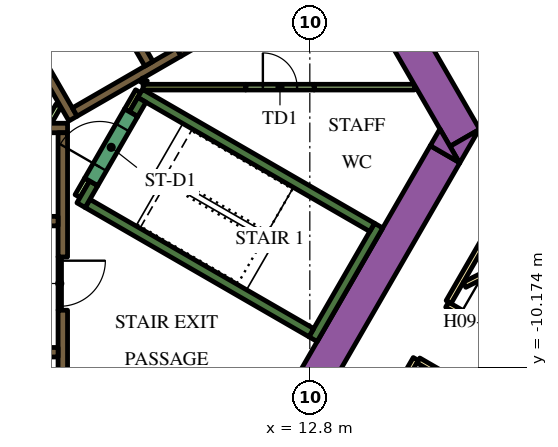
"""IFC4 building model, lengths in metres.
Left out: names, types, materials, properties, quantities, classifications, styles, units other than length and angle.
Written with IfcOpenShell. Run it as: python <this file> out.ifc"""

import sys

from ifc_helpers import new_model, si_unit, direction, frame, frame_2d, origin, place, context, subcontext, project, spatial, polyline, rectangle, outline, extrude, element, fill, save


model = new_model("IFC4")
c1 = context("Model", 3, precision=1e-05, world=origin(), true_north=direction((0.0, 1.0)))
c2 = subcontext(c1, "Body", "Model", "MODEL_VIEW")
j1 = project(units=[si_unit("LENGTHUNIT", "METRE"), si_unit("PLANEANGLEUNIT", "RADIAN")], contexts=[c1])
p1 = place(None, origin())
s1 = spatial("IfcSite", under=j1, at=p1, CompositionType="ELEMENT")
p2 = place(p1, origin())
s2 = spatial("IfcBuilding", under=s1, at=p2, CompositionType="ELEMENT")
p3 = place(p2, frame((0.0, 0.0, 126.6)))
s3 = spatial("IfcBuildingStorey", under=s2, at=p3, CompositionType="ELEMENT", Elevation=126.6)
p4 = place(p3, frame((6.776, 13.364, 0.0), z_axis=(0.0, 0.0, 1.0), x_axis=(0.500004177138, -0.8660229921, 0.0)))
e1 = element("IfcWall", 1, at=p4, inside=s3, PredefinedType="SOLIDWALL", context=c2, shape_type="SweptSolid", body=[
    extrude(rectangle(XDim=20.204, YDim=0.9, at=frame_2d((10.102, 0.0))), origin(), (0.0, 0.0, 1.0), 3.9),
])
p5 = place(p3, origin())
e2 = element("IfcWall", 2, at=p5, inside=s3, PredefinedType="SOLIDWALL", context=c2, shape_type="SweptSolid", body=[
    extrude(outline(polyline([(16.743, -4.8), (16.489, -4.36), (17.251, -3.92), (16.743, -4.8)])), origin(), (0.0, 0.0, 1.0), 3.9),
])
p6 = place(p3, frame((11.695, -12.644, 0.0), z_axis=(0.0, 0.0, 1.0), x_axis=(0.500010229568, 0.86601949766, 0.0)))
e3 = element("IfcWall", 3, at=p6, inside=s3, PredefinedType="SOLIDWALL", context=c2, shape_type="SweptSolid", body=[
    extrude(rectangle(XDim=9.326, YDim=0.9, at=frame_2d((4.663, 0.0))), origin(), (0.0, 0.0, 1.0), 3.9),
])
e4 = element("IfcWall", 4, at=p5, inside=s3, PredefinedType="SOLIDWALL", context=c2, shape_type="SweptSolid", body=[
    extrude(outline(polyline([(16.223, -3.9), (16.732, -4.78), (15.969, -4.34), (16.223, -3.9)])), origin(), (0.0, 0.0, 1.0), 3.9),
])
p7 = place(p3, frame((12.885, -9.431, 0.0), z_axis=(0.0, 0.0, 1.0), x_axis=(0.500020560727, 0.866013532718, 0.0)))
e5 = element("IfcWall", 5, at=p7, inside=s3, PredefinedType="SOLIDWALL", context=c2, shape_type="SweptSolid", body=[
    extrude(rectangle(XDim=3.45, YDim=0.25, at=frame_2d((1.725, 0.0))), origin(), (0.0, 0.0, 1.0), 3.9),
])
p8 = place(p3, frame((12.84, -9.261, 0.0), z_axis=(0.0, 0.0, 1.0), x_axis=(-0.866013990052, 0.500019768644, 0.0)))
e6 = element("IfcWall", 6, at=p8, inside=s3, PredefinedType="SOLIDWALL", context=c2, shape_type="SweptSolid", body=[
    extrude(rectangle(XDim=6.8, YDim=0.25, at=frame_2d((3.4, 0.0))), origin(), (0.0, 0.0, 1.0), 3.9),
])
p9 = place(p3, frame((7.113, -5.33, 0.0), z_axis=(0.0, 0.0, 1.0), x_axis=(-0.499965889992, -0.866045096311, 0.0)))
e7 = element("IfcWall", 7, at=p9, inside=s3, PredefinedType="SOLIDWALL", context=c2, shape_type="SweptSolid", body=[
    extrude(rectangle(XDim=0.666, YDim=0.25, at=frame_2d((0.333, 0.0))), origin(), (0.0, 0.0, 1.0), 3.9),
])
p10 = place(p3, frame((8.334, -2.964, 0.0), z_axis=(0.0, 0.0, 1.0), x_axis=(0.866016039709, -0.500016218704, 0.0)))
e8 = element("IfcWall", 8, at=p10, inside=s3, PredefinedType="SOLIDWALL", context=c2, shape_type="SweptSolid", body=[
    extrude(rectangle(XDim=7.05, YDim=0.25, at=frame_2d((3.525, 0.0))), origin(), (0.0, 0.0, 1.0), 3.9),
])
p11 = place(p3, frame((8.163, -3.511, 0.0), z_axis=(0.0, 0.0, 1.0), x_axis=(0.500127794843, 0.865951608824, 0.0)))
e9 = element("IfcWall", 9, at=p11, inside=s3, PredefinedType="SOLIDWALL", context=c2, shape_type="SweptSolid", body=[
    extrude(rectangle(XDim=0.435, YDim=0.25, at=frame_2d((0.217, 0.0))), origin(), (0.0, 0.0, 1.0), 3.9),
])
p12 = place(p3, frame((-6.19, -3.875, 0.0), z_axis=(0.0, 0.0, 1.0), x_axis=(1.0, 0.0, 0.0)))
e10 = element("IfcWall", 10, at=p12, inside=s3, PredefinedType="SOLIDWALL", context=c2, shape_type="SweptSolid", body=[
    extrude(rectangle(XDim=12.615, YDim=0.25, at=frame_2d((6.307, 0.0))), origin(), (0.0, 0.0, 1.0), 3.9),
])
p13 = place(p3, frame((6.3, -8.67, 0.0), z_axis=(0.0, 0.0, 1.0), x_axis=(0.0, -1.0, 0.0)))
e11 = element("IfcWall", 11, at=p13, inside=s3, PredefinedType="SOLIDWALL", context=c2, shape_type="SweptSolid", body=[
    extrude(rectangle(XDim=3.43, YDim=0.25, at=frame_2d((1.715, 0.0))), origin(), (0.0, 0.0, 1.0), 3.9),
])
p14 = place(p3, frame((6.3, -7.268, 0.0), z_axis=(0.0, 0.0, 1.0), x_axis=(0.0, 1.0, 0.0)))
e12 = element("IfcWall", 12, at=p14, inside=s3, PredefinedType="SOLIDWALL", context=c2, shape_type="SweptSolid", body=[
    extrude(rectangle(XDim=3.268, YDim=0.25, at=frame_2d((1.634, 0.0))), origin(), (0.0, 0.0, 1.0), 3.9),
])
e13 = element("IfcWall", 13, at=p5, inside=s3, PredefinedType="SOLIDWALL", context=c2, shape_type="SweptSolid", body=[
    extrude(outline(polyline([(0.335, 6.925), (0.335, 6.925), (0.335, 7.075), (0.335, 7.075), (0.335, 7.075), (0.245, 7.075), (0.079, 7.363), (0.035, 7.439), (0.252, 7.564), (0.377, 7.348), (6.552, -3.348), (6.677, -3.564), (6.46, -3.689), (4.897, -0.981), (0.332, 6.925), (0.335, 6.925), (0.335, 6.925)])), origin(), (0.0, 0.0, 1.0), 3.9),
])
p15 = place(p3, frame((9.352, -1.875, 0.0), z_axis=(0.0, 0.0, 1.0), x_axis=(-0.866024844342, -0.500000968981, 0.0)))
e14 = element("IfcWall", 14, at=p15, inside=s3, PredefinedType="SOLIDWALL", context=c2, shape_type="SweptSolid", body=[
    extrude(rectangle(XDim=3.162, YDim=0.25, at=frame_2d((1.581, 0.0))), origin(), (0.0, 0.0, 1.0), 3.9),
])
p16 = place(p3, frame((6.688, -5.667, 0.0), z_axis=(0.0, 0.0, 1.0), x_axis=(0.499834152157, 0.86612113491, 0.0)))
e15 = element("IfcWall", 15, at=p16, inside=s3, PredefinedType="PARTITIONING", context=c2, shape_type="SweptSolid", body=[
    extrude(rectangle(XDim=0.505, YDim=0.15, at=frame_2d((0.252, 0.0))), origin(), (0.0, 0.0, 1.0), 2.75),
])
p17 = place(p3, frame((5.936, -3.718, 0.0), z_axis=(0.0, 0.0, 1.0), x_axis=(0.499890179513, 0.866088799389, 0.0)))
e16 = element("IfcWall", 16, at=p17, inside=s3, PredefinedType="PARTITIONING", context=c2, shape_type="SweptSolid", body=[
    extrude(rectangle(XDim=0.504, YDim=0.15, at=frame_2d((0.252, 0.0))), origin(), (0.0, 0.0, 1.0), 2.75),
])
p18 = place(p3, frame((8.412, -2.8, 0.0), z_axis=(0.0, 0.0, 1.0), x_axis=(1.0, 0.0, 0.0)))
e17 = element("IfcWall", 17, at=p18, inside=s3, PredefinedType="PARTITIONING", context=c2, shape_type="SweptSolid", body=[
    extrude(rectangle(XDim=2.702, YDim=0.15, at=frame_2d((1.351, 0.0))), origin(), (0.0, 0.0, 1.0), 3.9),
])
p19 = place(p3, frame((8.459, -2.599, 0.0), z_axis=(0.0, 0.0, 1.0), x_axis=(-0.501919277433, -0.864914469148, 0.0)))
e18 = element("IfcWall", 18, at=p19, inside=s3, PredefinedType="PARTITIONING", context=c2, shape_type="SweptSolid", body=[
    extrude(rectangle(XDim=0.109, YDim=0.15, at=frame_2d((0.054, 0.0))), origin(), (0.0, 0.0, 1.0), 3.9),
])
p20 = place(p3, frame((8.281, -2.907, 0.0), z_axis=(0.0, 0.0, 1.0), x_axis=(-0.500193841991, -0.86591346013, 0.0)))
e19 = element("IfcWall", 19, at=p20, inside=s3, PredefinedType="PARTITIONING", context=c2, shape_type="SweptSolid", body=[
    extrude(rectangle(XDim=0.583, YDim=0.15, at=frame_2d((0.292, 0.0))), origin(), (0.0, 0.0, 1.0), 3.9),
])
p21 = place(p3, frame((12.915, -2.8, 0.0), z_axis=(0.0, 0.0, 1.0), x_axis=(1.0, 0.0, 0.0)))
e20 = element("IfcWall", 20, at=p21, inside=s3, PredefinedType="PARTITIONING", context=c2, shape_type="SweptSolid", body=[
    extrude(rectangle(XDim=2.637, YDim=0.15, at=frame_2d((1.318, 0.0))), origin(), (0.0, 0.0, 1.0), 2.75),
])
p22 = place(p3, frame((-6.175, -9.775, 0.0), z_axis=(0.0, 0.0, 1.0), x_axis=(1.0, 0.0, 0.0)))
e21 = element("IfcWall", 21, at=p22, inside=s3, PredefinedType="SOLIDWALL", context=c2, shape_type="SweptSolid", body=[
    extrude(rectangle(XDim=12.35, YDim=0.25, at=frame_2d((6.175, 0.0))), origin(), (0.0, 0.0, 1.0), 3.9),
])
p23 = place(p22, frame((0.585, 0.0, 0.0)))
e22 = element("IfcOpeningElement", 22, at=p23, cuts=e21, PredefinedType="OPENING", context=c2, shape_type="SweptSolid", body=[
    extrude(rectangle(XDim=1.1, YDim=2.1, at=frame_2d((0.55, 1.05))), frame((0.0, 0.135, 0.0), z_axis=(0.0, -1.0, 0.0), x_axis=(1.0, 0.0, 0.0)), (0.0, 0.0, 1.0), 0.27),
])
p24 = place(p22, frame((3.105, 0.0, 0.0)))
e23 = element("IfcOpeningElement", 23, at=p24, cuts=e21, PredefinedType="OPENING", context=c2, shape_type="SweptSolid", body=[
    extrude(rectangle(XDim=1.1, YDim=2.1, at=frame_2d((0.55, 1.05))), frame((0.0, 0.135, 0.0), z_axis=(0.0, -1.0, 0.0), x_axis=(1.0, 0.0, 0.0)), (0.0, 0.0, 1.0), 0.27),
])
p25 = place(p22, frame((5.625, 0.0, 0.0)))
e24 = element("IfcOpeningElement", 24, at=p25, cuts=e21, PredefinedType="OPENING", context=c2, shape_type="SweptSolid", body=[
    extrude(rectangle(XDim=1.1, YDim=2.1, at=frame_2d((0.55, 1.05))), frame((0.0, 0.135, 0.0), z_axis=(0.0, -1.0, 0.0), x_axis=(1.0, 0.0, 0.0)), (0.0, 0.0, 1.0), 0.27),
])
p26 = place(p22, frame((8.145, 0.0, 0.0)))
e25 = element("IfcOpeningElement", 25, at=p26, cuts=e21, PredefinedType="OPENING", context=c2, shape_type="SweptSolid", body=[
    extrude(rectangle(XDim=1.1, YDim=2.1, at=frame_2d((0.55, 1.05))), frame((0.0, 0.135, 0.0), z_axis=(0.0, -1.0, 0.0), x_axis=(1.0, 0.0, 0.0)), (0.0, 0.0, 1.0), 0.27),
])
p27 = place(p22, frame((10.665, 0.0, 0.0)))
e26 = element("IfcOpeningElement", 26, at=p27, cuts=e21, PredefinedType="OPENING", context=c2, shape_type="SweptSolid", body=[
    extrude(rectangle(XDim=1.1, YDim=2.1, at=frame_2d((0.55, 1.05))), frame((0.0, 0.135, 0.0), z_axis=(0.0, -1.0, 0.0), x_axis=(1.0, 0.0, 0.0)), (0.0, 0.0, 1.0), 0.27),
])
p28 = place(p3, frame((-6.175, -6.325, 0.0), z_axis=(0.0, 0.0, 1.0), x_axis=(1.0, 0.0, 0.0)))
e27 = element("IfcWall", 27, at=p28, inside=s3, PredefinedType="SOLIDWALL", context=c2, shape_type="SweptSolid", body=[
    extrude(rectangle(XDim=12.35, YDim=0.25, at=frame_2d((6.175, 0.0))), origin(), (0.0, 0.0, 1.0), 3.9),
])
p29 = place(p28, frame((3.205, 0.0, 0.0)))
e28 = element("IfcOpeningElement", 28, at=p29, cuts=e27, PredefinedType="OPENING", context=c2, shape_type="SweptSolid", body=[
    extrude(rectangle(XDim=0.9, YDim=2.1, at=frame_2d((0.45, 1.05))), frame((0.0, 0.135, 0.0), z_axis=(0.0, -1.0, 0.0), x_axis=(1.0, 0.0, 0.0)), (0.0, 0.0, 1.0), 0.27),
])
p30 = place(p28, frame((8.145, 0.0, 0.0)))
e29 = element("IfcOpeningElement", 29, at=p30, cuts=e27, PredefinedType="OPENING", context=c2, shape_type="SweptSolid", body=[
    extrude(rectangle(XDim=1.1, YDim=2.1, at=frame_2d((0.55, 1.05))), frame((0.0, 0.135, 0.0), z_axis=(0.0, -1.0, 0.0), x_axis=(1.0, 0.0, 0.0)), (0.0, 0.0, 1.0), 0.27),
])
p31 = place(p28, frame((10.665, 0.0, 0.0)))
e30 = element("IfcOpeningElement", 30, at=p31, cuts=e27, PredefinedType="OPENING", context=c2, shape_type="SweptSolid", body=[
    extrude(rectangle(XDim=1.1, YDim=2.1, at=frame_2d((0.55, 1.05))), frame((0.0, 0.135, 0.0), z_axis=(0.0, -1.0, 0.0), x_axis=(1.0, 0.0, 0.0)), (0.0, 0.0, 1.0), 0.27),
])
p32 = place(p3, frame((8.565, -2.185, 0.0), z_axis=(0.0, 0.0, 1.0), x_axis=(-0.499997954832, 0.866026584559, 0.0)))
e31 = element("IfcWall", 31, at=p32, inside=s3, PredefinedType="SOLIDWALL", context=c2, shape_type="SweptSolid", body=[
    extrude(rectangle(XDim=12.35, YDim=0.25, at=frame_2d((6.175, 0.0))), origin(), (0.0, 0.0, 1.0), 3.9),
])
p33 = place(p32, frame((5.725, 0.0, 0.0)))
e32 = element("IfcOpeningElement", 32, at=p33, cuts=e31, PredefinedType="OPENING", context=c2, shape_type="SweptSolid", body=[
    extrude(rectangle(XDim=0.9, YDim=2.1, at=frame_2d((0.45, 1.05))), frame((0.0, 0.135, 0.0), z_axis=(0.0, -1.0, 0.0), x_axis=(1.0, 0.0, 0.0)), (0.0, 0.0, 1.0), 0.27),
])
p34 = place(p3, frame((7.048, -5.292, 0.0), z_axis=(0.0, 0.0, 1.0), x_axis=(0.49994051562, 0.866059744384, 0.0)))
e33 = element("IfcWall", 33, at=p34, inside=s3, PredefinedType="SOLIDWALL", context=c2, shape_type="SweptSolid", body=[
    extrude(rectangle(XDim=2.1, YDim=0.4, at=frame_2d((1.05, 0.0))), origin(), (0.0, 0.0, 1.0), 3.9),
])
p35 = place(p34, frame((0.45, 0.0, 0.0)))
e34 = element("IfcOpeningElement", 34, at=p35, cuts=e33, PredefinedType="OPENING", context=c2, shape_type="SweptSolid", body=[
    extrude(rectangle(XDim=1.2, YDim=2.1, at=frame_2d((0.6, 1.05))), frame((0.0, 0.21, 0.0), z_axis=(0.0, -1.0, 0.0), x_axis=(1.0, 0.0, 0.0)), (0.0, 0.0, 1.0), 0.42),
])
p36 = place(p3, frame((6.22, -7.266, 0.0), z_axis=(0.0, 0.0, 1.0), x_axis=(0.0, -1.0, 0.0)))
e35 = element("IfcWall", 35, at=p36, inside=s3, PredefinedType="PARTITIONING", context=c2, shape_type="SweptSolid", body=[
    extrude(rectangle(XDim=1.4, YDim=0.09, at=frame_2d((0.7, 0.0))), origin(), (0.0, 0.0, 1.0), 2.75),
])
p37 = place(p36, frame((0.1, 0.0, 0.0)))
e36 = element("IfcOpeningElement", 36, at=p37, cuts=e35, PredefinedType="OPENING", context=c2, shape_type="SweptSolid", body=[
    extrude(rectangle(XDim=1.2, YDim=2.1, at=frame_2d((0.6, 1.05))), frame((0.0, 0.055, 0.0), z_axis=(0.0, -1.0, 0.0), x_axis=(1.0, 0.0, 0.0)), (0.0, 0.0, 1.0), 0.11),
])
p38 = place(p3, frame((9.352, -1.875, 0.0), z_axis=(0.0, 0.0, 1.0), x_axis=(0.865989075817, 0.500062916607, 0.0)))
e37 = element("IfcWall", 37, at=p38, inside=s3, PredefinedType="SOLIDWALL", context=c2, shape_type="SweptSolid", body=[
    extrude(rectangle(XDim=1.8, YDim=0.25, at=frame_2d((0.9, 0.0))), origin(), (0.0, 0.0, 1.0), 3.9),
])
p39 = place(p38, frame((0.45, 0.0, 0.0)))
e38 = element("IfcOpeningElement", 38, at=p39, cuts=e37, PredefinedType="OPENING", context=c2, shape_type="SweptSolid", body=[
    extrude(rectangle(XDim=0.9, YDim=2.1, at=frame_2d((0.45, 1.05))), frame((0.0, 0.135, 0.0), z_axis=(0.0, -1.0, 0.0), x_axis=(1.0, 0.0, 0.0)), (0.0, 0.0, 1.0), 0.27),
])
p40 = place(p3, frame((11.115, -2.8, 0.0), z_axis=(0.0, 0.0, 1.0), x_axis=(1.0, 0.0, 0.0)))
e39 = element("IfcWall", 39, at=p40, inside=s3, PredefinedType="PARTITIONING", context=c2, shape_type="SweptSolid", body=[
    extrude(rectangle(XDim=1.8, YDim=0.15, at=frame_2d((0.9, 0.0))), origin(), (0.0, 0.0, 1.0), 2.75),
])
p41 = place(p40, frame((0.45, 0.0, 0.0)))
e40 = element("IfcOpeningElement", 40, at=p41, cuts=e39, PredefinedType="OPENING", context=c2, shape_type="SweptSolid", body=[
    extrude(rectangle(XDim=0.9, YDim=2.1, at=frame_2d((0.45, 1.05))), frame((0.0, 0.085, 0.0), z_axis=(0.0, -1.0, 0.0), x_axis=(1.0, 0.0, 0.0)), (0.0, 0.0, 1.0), 0.17),
])
p42 = place(p3, frame((16.412, -8.523, 0.0), z_axis=(0.0, 0.0, 1.0), x_axis=(0.866025629663, -0.499999608766, 0.0)))
e41 = element("IfcWall", 41, at=p42, inside=s3, PredefinedType="PARTITIONING", context=c2, shape_type="SweptSolid", body=[
    extrude(rectangle(XDim=13.624, YDim=0.15, at=frame_2d((6.812, 0.0))), origin(), (0.0, 0.0, 1.0), 2.75),
])
p43 = place(p42, frame((0.426, 0.0, 0.0)))
e42 = element("IfcOpeningElement", 42, at=p43, cuts=e41, PredefinedType="OPENING", context=c2, shape_type="SweptSolid", body=[
    extrude(rectangle(XDim=1.0, YDim=2.1, at=frame_2d((0.5, 1.05))), frame((0.0, 0.085, 0.0), z_axis=(0.0, -1.0, 0.0), x_axis=(1.0, 0.0, 0.0)), (0.0, 0.0, 1.0), 0.17),
])
p44 = place(p3, frame((19.081, -3.9, 0.0), z_axis=(0.0, 0.0, 1.0), x_axis=(-0.499974327079, -0.866040225545, 0.0)))
e43 = element("IfcWall", 43, at=p44, inside=s3, PredefinedType="PARTITIONING", context=c2, shape_type="SweptSolid", body=[
    extrude(rectangle(XDim=5.258, YDim=0.15, at=frame_2d((2.629, 0.0))), origin(), (0.0, 0.0, 1.0), 2.75),
])
p45 = place(p3, frame((6.163, 18.475, 0.0), z_axis=(0.0, 0.0, 1.0), x_axis=(0.500001317485, -0.866024643133, 0.0)))
e44 = element("IfcWall", 44, at=p45, inside=s3, PredefinedType="PARTITIONING", context=c2, shape_type="SweptSolid", body=[
    extrude(rectangle(XDim=25.767, YDim=0.15, at=frame_2d((12.883, 0.0))), origin(), (0.0, 0.0, 1.0), 2.75),
])
p46 = place(p45, frame((19.306, 0.0, 0.0)))
e45 = element("IfcOpeningElement", 45, at=p46, cuts=e44, PredefinedType="OPENING", context=c2, shape_type="SweptSolid", body=[
    extrude(rectangle(XDim=1.0, YDim=2.1, at=frame_2d((0.5, 1.05))), frame((0.0, 0.085, 0.0), z_axis=(0.0, -1.0, 0.0), x_axis=(1.0, 0.0, 0.0)), (0.0, 0.0, 1.0), 0.17),
])
p47 = place(p45, frame((17.999, 0.0, 0.0)))
e46 = element("IfcOpeningElement", 46, at=p47, cuts=e44, PredefinedType="OPENING", context=c2, shape_type="SweptSolid", body=[
    extrude(rectangle(XDim=1.0, YDim=2.1, at=frame_2d((0.5, 1.05))), frame((0.0, 0.085, 0.0), z_axis=(0.0, -1.0, 0.0), x_axis=(1.0, 0.0, 0.0)), (0.0, 0.0, 1.0), 0.17),
])
p48 = place(p45, frame((0.596, 0.0, 0.0)))
e47 = element("IfcOpeningElement", 47, at=p48, cuts=e44, PredefinedType="OPENING", context=c2, shape_type="SweptSolid", body=[
    extrude(rectangle(XDim=1.0, YDim=2.1, at=frame_2d((0.5, 1.05))), frame((0.0, 0.085, 0.0), z_axis=(0.0, -1.0, 0.0), x_axis=(1.0, 0.0, 0.0)), (0.0, 0.0, 1.0), 0.17),
])
p49 = place(p3, frame((15.587, -9.952, 0.0), z_axis=(0.0, 0.0, 1.0), x_axis=(-0.500016618951, -0.866015808616, 0.0)))
e48 = element("IfcWall", 48, at=p49, inside=s3, PredefinedType="PARTITIONING", context=c2, shape_type="SweptSolid", body=[
    extrude(rectangle(XDim=5.268, YDim=0.15, at=frame_2d((2.634, 0.0))), origin(), (0.0, 0.0, 1.0), 2.75),
])
p50 = place(p49, frame((4.088, 0.0, 0.0)))
e49 = element("IfcOpeningElement", 49, at=p50, cuts=e48, PredefinedType="OPENING", context=c2, shape_type="SweptSolid", body=[
    extrude(rectangle(XDim=1.0, YDim=2.1, at=frame_2d((0.5, 1.05))), frame((0.0, 0.085, 0.0), z_axis=(0.0, -1.0, 0.0), x_axis=(1.0, 0.0, 0.0)), (0.0, 0.0, 1.0), 0.17),
])
p51 = place(p3, frame((27.386, -16.764, 0.0), z_axis=(0.0, 0.0, 1.0), x_axis=(-0.866022585856, 0.500004880763, 0.0)))
e50 = element("IfcWall", 50, at=p51, inside=s3, PredefinedType="PARTITIONING", context=c2, shape_type="SweptSolid", body=[
    extrude(rectangle(XDim=13.544, YDim=0.15, at=frame_2d((6.772, 0.0))), origin(), (0.0, 0.0, 1.0), 2.75),
])
p52 = place(p51, frame((8.491, 0.0, 0.0)))
e51 = element("IfcOpeningElement", 51, at=p52, cuts=e50, PredefinedType="OPENING", context=c2, shape_type="SweptSolid", body=[
    extrude(rectangle(XDim=1.0, YDim=2.1, at=frame_2d((0.5, 1.05))), frame((0.0, 0.085, 0.0), z_axis=(0.0, -1.0, 0.0), x_axis=(1.0, 0.0, 0.0)), (0.0, 0.0, 1.0), 0.17),
])
p53 = place(p3, frame((26.591, -3.122, 0.0), z_axis=(0.0, 0.0, 1.0), x_axis=(-0.893766213273, -0.448533115847, 0.0)))
e52 = element("IfcWall", 52, at=p53, inside=s3, PredefinedType="PARTITIONING", context=c2, shape_type="SweptSolid", body=[
    extrude(rectangle(XDim=10.875, YDim=0.15, at=frame_2d((5.438, 0.0))), origin(), (0.0, 0.0, 1.0), 2.75),
])
p54 = place(p35, origin())
e53 = element("IfcDoor", 53, at=p54, inside=s3, OperationType="SINGLE_SWING_LEFT", PredefinedType="DOOR", context=c2, shape_type="SweptSolid", body=[
    extrude(rectangle(XDim=1.2, YDim=2.1, at=frame_2d((0.6, 1.05))), frame((0.0, 0.025, 0.0), z_axis=(0.0, -1.0, 0.0), x_axis=(1.0, 0.0, 0.0)), (0.0, 0.0, 1.0), 0.05),
])
fill(e34, e53)
p55 = place(p37, origin())
e54 = element("IfcDoor", 54, at=p55, inside=s3, OperationType="SINGLE_SWING_LEFT", PredefinedType="DOOR", context=c2, shape_type="SweptSolid", body=[
    extrude(rectangle(XDim=1.2, YDim=2.1, at=frame_2d((0.6, 1.05))), frame((0.0, 0.025, 0.0), z_axis=(0.0, -1.0, 0.0), x_axis=(1.0, 0.0, 0.0)), (0.0, 0.0, 1.0), 0.05),
])
fill(e36, e54)
p56 = place(p41, origin())
e55 = element("IfcDoor", 55, at=p56, inside=s3, OperationType="SINGLE_SWING_LEFT", PredefinedType="DOOR", context=c2, shape_type="SweptSolid", body=[
    extrude(rectangle(XDim=0.9, YDim=2.1, at=frame_2d((0.45, 1.05))), frame((0.0, 0.025, 0.0), z_axis=(0.0, -1.0, 0.0), x_axis=(1.0, 0.0, 0.0)), (0.0, 0.0, 1.0), 0.05),
])
fill(e40, e55)
p57 = place(p43, origin())
e56 = element("IfcDoor", 56, at=p57, inside=s3, OperationType="SINGLE_SWING_LEFT", PredefinedType="DOOR", context=c2, shape_type="SweptSolid", body=[
    extrude(rectangle(XDim=1.0, YDim=2.1, at=frame_2d((0.5, 1.05))), frame((0.0, 0.025, 0.0), z_axis=(0.0, -1.0, 0.0), x_axis=(1.0, 0.0, 0.0)), (0.0, 0.0, 1.0), 0.05),
])
fill(e42, e56)
save(model, sys.argv[1])
